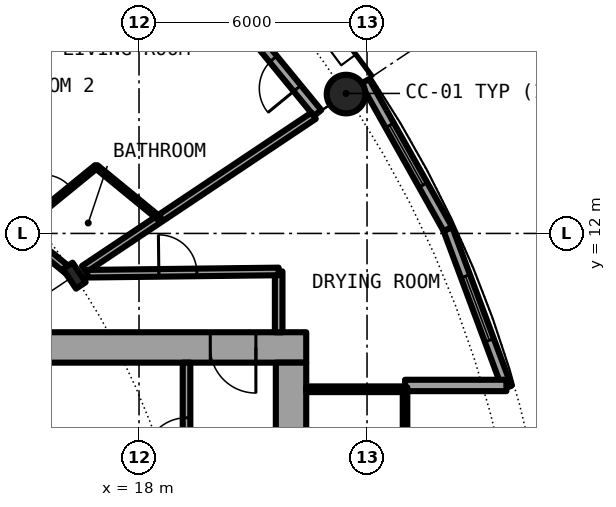
"""IFC4 building model, lengths in metres.
Left out: names, types, materials, properties, quantities, classifications, styles, units other than length and angle.
Written with IfcOpenShell. Run it as: python <this file> out.ifc"""

import sys

from ifc_helpers import new_model, si_unit, direction, frame, frame_2d, origin, origin_2d, place, context, subcontext, project, spatial, rectangle, hollow_circle, i_section, extrude, element, fill, save


model = new_model("IFC4")
c1 = context("Model", 3, precision=1e-05, world=origin(), true_north=direction((0.0, 1.0)))
c2 = subcontext(c1, "Body", "Model", "MODEL_VIEW")
j1 = project(units=[si_unit("LENGTHUNIT", "METRE"), si_unit("PLANEANGLEUNIT", "RADIAN")], contexts=[c1])
p1 = place(None, origin())
s1 = spatial("IfcSite", under=j1, at=p1, CompositionType="ELEMENT")
p2 = place(p1, origin())
s2 = spatial("IfcBuilding", under=s1, at=p2, CompositionType="ELEMENT")
p3 = place(p2, frame((0.0, 0.0, 50.25)))
s3 = spatial("IfcBuildingStorey", under=s2, at=p3, CompositionType="ELEMENT", Elevation=50.25)
p4 = place(p3, frame((23.448, 15.667, 0.0), z_axis=(0.0, 0.0, 1.0), x_axis=(1.0, 0.0, 0.0)))
e1 = element("IfcColumn", 1, at=p4, inside=s3, PredefinedType="COLUMN", context=c2, shape_type="SweptSolid", body=[
    extrude(hollow_circle(Radius=0.508, WallThickness=0.05, at=origin_2d()), origin(), (0.0, 0.0, 1.0), 3.05),
])
p5 = place(p3, frame((16.297, 10.889, 0.0), z_axis=(0.0, 0.0, 1.0), x_axis=(0.831469612303, 0.55557023302, 0.0)))
e2 = element("IfcColumn", 2, at=p5, inside=s3, PredefinedType="COLUMN", context=c2, shape_type="SweptSolid", body=[
    extrude(i_section(OverallWidth=0.305, OverallDepth=0.62, WebThickness=0.021, FlangeThickness=0.04, FilletRadius=0.027, at=origin_2d()), origin(), (0.0, 0.0, 1.0), 3.05),
])
p6 = place(p3, frame((22.699, 15.167, 0.0), z_axis=(0.0, 0.0, 1.0), x_axis=(-0.634382322723, 0.773019449054, 0.0)))
e3 = element("IfcWall", 3, at=p6, inside=s3, PredefinedType="SOLIDWALL", context=c2, shape_type="SweptSolid", body=[
    extrude(rectangle(XDim=5.352, YDim=0.25, at=frame_2d((2.676, 0.0))), origin(), (0.0, 0.0, 1.0), 2.7),
])
p7 = place(p6, frame((0.841, 0.0, 0.0)))
e4 = element("IfcOpeningElement", 4, at=p7, cuts=e3, PredefinedType="OPENING", context=c2, shape_type="SweptSolid", body=[
    extrude(rectangle(XDim=1.0, YDim=2.2, at=frame_2d((0.5, 1.1))), frame((0.0, 0.135, 0.0), z_axis=(0.0, -1.0, 0.0), x_axis=(1.0, 0.0, 0.0)), (0.0, 0.0, 1.0), 0.27),
])
p8 = place(p6, frame((3.111, 0.0, 0.3)))
e5 = element("IfcOpeningElement", 5, at=p8, cuts=e3, PredefinedType="OPENING", context=c2, shape_type="SweptSolid", body=[
    extrude(rectangle(XDim=1.8, YDim=2.1, at=frame_2d((0.9, 1.05))), frame((0.0, 0.135, 0.0), z_axis=(0.0, -1.0, 0.0), x_axis=(1.0, 0.0, 0.0)), (0.0, 0.0, 1.0), 0.27),
])
p9 = place(p3, frame((27.682, 7.945, 0.0), z_axis=(0.0, 0.0, 1.0), x_axis=(-0.349247811493, 0.937030397675, 0.0)))
e6 = element("IfcWall", 6, at=p9, inside=s3, PredefinedType="SOLIDWALL", context=c2, shape_type="SweptSolid", body=[
    extrude(rectangle(XDim=4.452, YDim=0.25, at=frame_2d((2.226, 0.0))), origin(), (0.0, 0.0, 1.0), 2.7),
])
p10 = place(p9, frame((1.327, 0.0, 0.3)))
e7 = element("IfcOpeningElement", 7, at=p10, cuts=e6, PredefinedType="OPENING", context=c2, shape_type="SweptSolid", body=[
    extrude(rectangle(XDim=1.8, YDim=2.1, at=frame_2d((0.9, 1.05))), frame((0.0, 0.135, 0.0), z_axis=(0.0, -1.0, 0.0), x_axis=(1.0, 0.0, 0.0)), (0.0, 0.0, 1.0), 0.27),
])
p11 = place(p3, frame((26.127, 12.117, 0.0), z_axis=(0.0, 0.0, 1.0), x_axis=(-0.489696356642, 0.871893042919, 0.0)))
e8 = element("IfcWall", 8, at=p11, inside=s3, PredefinedType="SOLIDWALL", context=c2, shape_type="SweptSolid", body=[
    extrude(rectangle(XDim=4.454, YDim=0.25, at=frame_2d((2.227, 0.0))), origin(), (0.0, 0.0, 1.0), 2.7),
])
p12 = place(p11, frame((1.327, 0.0, 0.3)))
e9 = element("IfcOpeningElement", 9, at=p12, cuts=e8, PredefinedType="OPENING", context=c2, shape_type="SweptSolid", body=[
    extrude(rectangle(XDim=1.8, YDim=2.1, at=frame_2d((0.9, 1.05))), frame((0.0, 0.135, 0.0), z_axis=(0.0, -1.0, 0.0), x_axis=(1.0, 0.0, 0.0)), (0.0, 0.0, 1.0), 0.27),
])
p13 = place(p3, frame((25.0, 8.0, 0.0), z_axis=(0.0, 0.0, 1.0), x_axis=(1.0, 0.0, 0.0)))
e10 = element("IfcWall", 10, at=p13, inside=s3, PredefinedType="SOLIDWALL", context=c2, shape_type="SweptSolid", body=[
    extrude(rectangle(XDim=2.667, YDim=0.3, at=frame_2d((1.333, 0.0))), origin(), (0.0, 0.0, 1.0), 2.7),
])
p14 = place(p3, frame((22.4, 9.0, 0.0), z_axis=(0.0, 0.0, 1.0), x_axis=(-1.0, 0.0, 0.0)))
e11 = element("IfcWall", 11, at=p14, inside=s3, PredefinedType="SHEAR", context=c2, shape_type="SweptSolid", body=[
    extrude(rectangle(XDim=14.2, YDim=0.8, at=frame_2d((7.1, 0.0))), origin(), (0.0, 0.0, 1.0), 3.05),
])
p15 = place(p14, frame((1.325, 0.0, 0.0)))
e12 = element("IfcOpeningElement", 12, at=p15, cuts=e11, PredefinedType="OPENING", context=c2, shape_type="SweptSolid", body=[
    extrude(rectangle(XDim=1.2, YDim=2.3, at=frame_2d((0.6, 1.15))), frame((0.0, 0.41, 0.0), z_axis=(0.0, -1.0, 0.0), x_axis=(1.0, 0.0, 0.0)), (0.0, 0.0, 1.0), 0.82),
])
p16 = place(p3, frame((22.0, 8.6, 0.0), z_axis=(0.0, 0.0, 1.0), x_axis=(0.0, -1.0, 0.0)))
e13 = element("IfcWall", 13, at=p16, inside=s3, PredefinedType="SHEAR", context=c2, shape_type="SweptSolid", body=[
    extrude(rectangle(XDim=17.2, YDim=0.8, at=frame_2d((8.6, 0.0))), origin(), (0.0, 0.0, 1.0), 3.05),
])
p17 = place(p16, frame((7.7, 0.0, 0.0)))
e14 = element("IfcOpeningElement", 14, at=p17, cuts=e13, PredefinedType="OPENING", context=c2, shape_type="SweptSolid", body=[
    extrude(rectangle(XDim=1.8, YDim=2.3, at=frame_2d((0.9, 1.15))), frame((0.0, 0.41, 0.0), z_axis=(0.0, -1.0, 0.0), x_axis=(1.0, 0.0, 0.0)), (0.0, 0.0, 1.0), 0.82),
])
p18 = place(p3, frame((19.25, 1.575, 0.0), z_axis=(0.0, 0.0, 1.0), x_axis=(0.0, 1.0, 0.0)))
e15 = element("IfcWall", 15, at=p18, inside=s3, PredefinedType="SOLIDWALL", context=c2, shape_type="SweptSolid", body=[
    extrude(rectangle(XDim=7.025, YDim=0.2, at=frame_2d((3.513, 0.0))), origin(), (0.0, 0.0, 1.0), 2.7),
])
p19 = place(p18, frame((4.475, 0.0, 0.0)))
e16 = element("IfcOpeningElement", 16, at=p19, cuts=e15, PredefinedType="OPENING", context=c2, shape_type="SweptSolid", body=[
    extrude(rectangle(XDim=1.1, YDim=2.3, at=frame_2d((0.55, 1.15))), frame((0.0, 0.11, 0.0), z_axis=(0.0, -1.0, 0.0), x_axis=(1.0, 0.0, 0.0)), (0.0, 0.0, 1.0), 0.22),
])
p20 = place(p3, frame((22.4, 7.9, 0.0), z_axis=(0.0, 0.0, 1.0), x_axis=(1.0, 0.0, 0.0)))
e17 = element("IfcWall", 17, at=p20, inside=s3, PredefinedType="PARTITIONING", context=c2, shape_type="SweptSolid", body=[
    extrude(rectangle(XDim=2.54, YDim=0.15, at=frame_2d((1.27, 0.0))), origin(), (0.0, 0.0, 1.0), 2.7),
])
p21 = place(p3, frame((25.0, -7.95, 0.0), z_axis=(0.0, 0.0, 1.0), x_axis=(0.0, 1.0, 0.0)))
e18 = element("IfcWall", 18, at=p21, inside=s3, PredefinedType="PARTITIONING", context=c2, shape_type="SweptSolid", body=[
    extrude(rectangle(XDim=15.9, YDim=0.12, at=frame_2d((7.95, 0.0))), origin(), (0.0, 0.0, 1.0), 2.7),
])
p22 = place(p21, frame((0.95, 0.0, 0.1)))
e19 = element("IfcOpeningElement", 19, at=p22, cuts=e18, PredefinedType="OPENING", context=c2, shape_type="SweptSolid", body=[
    extrude(rectangle(XDim=14.0, YDim=2.35, at=frame_2d((7.0, 1.175))), frame((0.0, 0.07, 0.0), z_axis=(0.0, -1.0, 0.0), x_axis=(1.0, 0.0, 0.0)), (0.0, 0.0, 1.0), 0.14),
])
p23 = place(p3, frame((21.675, 9.4, 0.0), z_axis=(0.0, 0.0, 1.0), x_axis=(0.0, 1.0, 0.0)))
e20 = element("IfcWall", 20, at=p23, inside=s3, PredefinedType="PARTITIONING", context=c2, shape_type="SweptSolid", body=[
    extrude(rectangle(XDim=1.6, YDim=0.2, at=frame_2d((0.8, 0.0))), origin(), (0.0, 0.0, 1.0), 2.7),
])
p24 = place(p3, frame((11.899, 14.499, 0.0), z_axis=(0.0, 0.0, 1.0), x_axis=(0.634396151441, 0.77300810024, 0.0)))
e21 = element("IfcWall", 21, at=p24, inside=s3, PredefinedType="PARTITIONING", context=c2, shape_type="SweptSolid", body=[
    extrude(rectangle(XDim=8.419, YDim=0.1, at=frame_2d((4.209, 0.0))), origin(), (0.0, 0.0, 1.0), 2.7),
])
p25 = place(p24, frame((0.84, 0.0, 0.0)))
e22 = element("IfcOpeningElement", 22, at=p25, cuts=e21, PredefinedType="OPENING", context=c2, shape_type="SweptSolid", body=[
    extrude(rectangle(XDim=0.9, YDim=2.3, at=frame_2d((0.45, 1.15))), frame((0.0, 0.06, 0.0), z_axis=(0.0, -1.0, 0.0), x_axis=(1.0, 0.0, 0.0)), (0.0, 0.0, 1.0), 0.12),
])
p26 = place(p24, frame((5.051, 0.0, 0.0)))
e23 = element("IfcOpeningElement", 23, at=p26, cuts=e21, PredefinedType="OPENING", context=c2, shape_type="SweptSolid", body=[
    extrude(rectangle(XDim=0.9, YDim=2.3, at=frame_2d((0.45, 1.15))), frame((0.0, 0.06, 0.0), z_axis=(0.0, -1.0, 0.0), x_axis=(1.0, 0.0, 0.0)), (0.0, 0.0, 1.0), 0.12),
])
p27 = place(p3, frame((14.831, 12.092, 0.0), z_axis=(0.0, 0.0, 1.0), x_axis=(0.774979608522, 0.631986239072, 0.0)))
e24 = element("IfcWall", 24, at=p27, inside=s3, PredefinedType="PARTITIONING", context=c2, shape_type="SweptSolid", body=[
    extrude(rectangle(XDim=2.636, YDim=0.1, at=frame_2d((1.318, 0.0))), origin(), (0.0, 0.0, 1.0), 2.7),
])
p28 = place(p27, frame((0.868, 0.0, 0.0)))
e25 = element("IfcOpeningElement", 25, at=p28, cuts=e24, PredefinedType="OPENING", context=c2, shape_type="SweptSolid", body=[
    extrude(rectangle(XDim=0.9, YDim=2.3, at=frame_2d((0.45, 1.15))), frame((0.0, 0.06, 0.0), z_axis=(0.0, -1.0, 0.0), x_axis=(1.0, 0.0, 0.0)), (0.0, 0.0, 1.0), 0.12),
])
p29 = place(p3, frame((16.555, 11.061, 0.0), z_axis=(0.0, 0.0, 1.0), x_axis=(0.831403467378, 0.55566921314, 0.0)))
e26 = element("IfcWall", 26, at=p29, inside=s3, PredefinedType="PARTITIONING", context=c2, shape_type="SweptSolid", body=[
    extrude(rectangle(XDim=7.265, YDim=0.2, at=frame_2d((3.632, 0.0))), origin(), (0.0, 0.0, 1.0), 2.7),
])
p30 = place(p3, frame((16.636, 10.94, 0.0), z_axis=(0.0, 0.0, 1.0), x_axis=(0.999928980998, 0.011917758204, 0.0)))
e27 = element("IfcWall", 27, at=p30, inside=s3, PredefinedType="PARTITIONING", context=c2, shape_type="SweptSolid", body=[
    extrude(rectangle(XDim=5.039, YDim=0.2, at=frame_2d((2.52, 0.0))), origin(), (0.0, 0.0, 1.0), 2.7),
])
p31 = place(p30, frame((1.886, 0.0, 0.0)))
e28 = element("IfcOpeningElement", 28, at=p31, cuts=e27, PredefinedType="OPENING", context=c2, shape_type="SweptSolid", body=[
    extrude(rectangle(XDim=1.0, YDim=2.3, at=frame_2d((0.5, 1.15))), frame((0.0, 0.11, 0.0), z_axis=(0.0, -1.0, 0.0), x_axis=(1.0, 0.0, 0.0)), (0.0, 0.0, 1.0), 0.22),
])
p32 = place(p3, frame((7.5, 18.108, 0.0), z_axis=(0.0, 0.0, 1.0), x_axis=(0.773041360816, -0.634355621452, 0.0)))
e29 = element("IfcWall", 29, at=p32, inside=s3, PredefinedType="PARTITIONING", context=c2, shape_type="SweptSolid", body=[
    extrude(rectangle(XDim=11.221, YDim=0.2, at=frame_2d((5.61, 0.0))), origin(), (0.0, 0.0, 1.0), 2.38),
])
p33 = place(p32, frame((7.083, 0.0, 0.0)))
e30 = element("IfcOpeningElement", 30, at=p33, cuts=e29, PredefinedType="OPENING", context=c2, shape_type="SweptSolid", body=[
    extrude(rectangle(XDim=1.0, YDim=2.3, at=frame_2d((0.5, 1.15))), frame((0.0, 0.11, 0.0), z_axis=(0.0, -1.0, 0.0), x_axis=(1.0, 0.0, 0.0)), (0.0, 0.0, 1.0), 0.22),
])
p34 = place(p3, frame((16.874, 13.758, 0.0), z_axis=(0.0, 0.0, 1.0), x_axis=(0.772948171844, -0.634469166818, 0.0)))
e31 = element("IfcWall", 31, at=p34, inside=s3, PredefinedType="PARTITIONING", context=c2, shape_type="SweptSolid", body=[
    extrude(rectangle(XDim=2.158, YDim=0.1, at=frame_2d((1.079, 0.0))), origin(), (0.0, 0.0, 1.0), 2.7),
])
p35 = place(p7, origin())
e32 = element("IfcDoor", 32, at=p35, inside=s3, OperationType="SINGLE_SWING_LEFT", PredefinedType="DOOR", context=c2, shape_type="SweptSolid", body=[
    extrude(rectangle(XDim=1.0, YDim=2.2, at=frame_2d((0.5, 1.1))), frame((0.0, 0.025, 0.0), z_axis=(0.0, -1.0, 0.0), x_axis=(1.0, 0.0, 0.0)), (0.0, 0.0, 1.0), 0.05),
])
fill(e4, e32)
p36 = place(p10, origin())
e33 = element("IfcWindow", 33, at=p36, inside=s3, PartitioningType="SINGLE_PANEL", PredefinedType="WINDOW", context=c2, shape_type="SweptSolid", body=[
    extrude(rectangle(XDim=1.8, YDim=2.1, at=frame_2d((0.9, 1.05))), frame((0.0, 0.03, 0.0), z_axis=(0.0, -1.0, 0.0), x_axis=(1.0, 0.0, 0.0)), (0.0, 0.0, 1.0), 0.06),
])
fill(e7, e33)
p37 = place(p12, origin())
e34 = element("IfcWindow", 34, at=p37, inside=s3, PartitioningType="SINGLE_PANEL", PredefinedType="WINDOW", context=c2, shape_type="SweptSolid", body=[
    extrude(rectangle(XDim=1.8, YDim=2.1, at=frame_2d((0.9, 1.05))), frame((0.0, 0.03, 0.0), z_axis=(0.0, -1.0, 0.0), x_axis=(1.0, 0.0, 0.0)), (0.0, 0.0, 1.0), 0.06),
])
fill(e9, e34)
p38 = place(p19, origin())
e35 = element("IfcDoor", 35, at=p38, inside=s3, OperationType="SINGLE_SWING_LEFT", PredefinedType="DOOR", context=c2, shape_type="SweptSolid", body=[
    extrude(rectangle(XDim=1.1, YDim=2.3, at=frame_2d((0.55, 1.15))), frame((0.0, 0.025, 0.0), z_axis=(0.0, -1.0, 0.0), x_axis=(1.0, 0.0, 0.0)), (0.0, 0.0, 1.0), 0.05),
])
fill(e16, e35)
p39 = place(p15, origin())
e36 = element("IfcDoor", 36, at=p39, inside=s3, OperationType="SINGLE_SWING_RIGHT", PredefinedType="DOOR", context=c2, shape_type="SweptSolid", body=[
    extrude(rectangle(XDim=1.2, YDim=2.3, at=frame_2d((0.6, 1.15))), frame((0.0, 0.025, 0.0), z_axis=(0.0, -1.0, 0.0), x_axis=(1.0, 0.0, 0.0)), (0.0, 0.0, 1.0), 0.05),
])
fill(e12, e36)
p40 = place(p22, origin())
e37 = element("IfcWindow", 37, at=p40, inside=s3, PartitioningType="SINGLE_PANEL", PredefinedType="WINDOW", context=c2, shape_type="SweptSolid", body=[
    extrude(rectangle(XDim=14.0, YDim=2.35, at=frame_2d((7.0, 1.175))), frame((0.0, 0.03, 0.0), z_axis=(0.0, -1.0, 0.0), x_axis=(1.0, 0.0, 0.0)), (0.0, 0.0, 1.0), 0.06),
])
fill(e19, e37)
p41 = place(p28, origin())
e38 = element("IfcDoor", 38, at=p41, inside=s3, OperationType="SINGLE_SWING_RIGHT", PredefinedType="DOOR", context=c2, shape_type="SweptSolid", body=[
    extrude(rectangle(XDim=0.9, YDim=2.3, at=frame_2d((0.45, 1.15))), frame((0.0, 0.025, 0.0), z_axis=(0.0, -1.0, 0.0), x_axis=(1.0, 0.0, 0.0)), (0.0, 0.0, 1.0), 0.05),
])
fill(e25, e38)
p42 = place(p31, origin())
e39 = element("IfcDoor", 39, at=p42, inside=s3, OperationType="SINGLE_SWING_LEFT", PredefinedType="DOOR", context=c2, shape_type="SweptSolid", body=[
    extrude(rectangle(XDim=1.0, YDim=2.3, at=frame_2d((0.5, 1.15))), frame((0.0, 0.025, 0.0), z_axis=(0.0, -1.0, 0.0), x_axis=(1.0, 0.0, 0.0)), (0.0, 0.0, 1.0), 0.05),
])
fill(e28, e39)
save(model, sys.argv[1])
